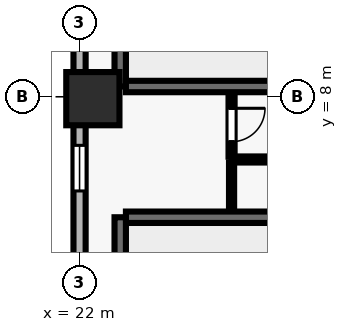
"""IFC4 building model, lengths in metres.
Left out: names, types, materials, properties, quantities, classifications, styles, units other than length and angle.
Written with IfcOpenShell. Run it as: python <this file> out.ifc"""

import sys

from ifc_helpers import new_model, si_unit, direction, frame, frame_2d, origin, origin_2d, place, context, subcontext, project, spatial, rectangle, extrude, element, fill, save


model = new_model("IFC4")
c1 = context("Model", 3, precision=1e-05, world=origin(), true_north=direction((0.0, 1.0)))
c2 = subcontext(c1, "Body", "Model", "MODEL_VIEW")
j1 = project(units=[si_unit("LENGTHUNIT", "METRE"), si_unit("PLANEANGLEUNIT", "RADIAN")], contexts=[c1])
p1 = place(None, origin())
s1 = spatial("IfcSite", under=j1, at=p1, CompositionType="ELEMENT")
p2 = place(p1, origin())
s2 = spatial("IfcBuilding", under=s1, at=p2, CompositionType="ELEMENT")
p3 = place(p2, frame((0.0, 0.0, 54.4)))
s3 = spatial("IfcBuildingStorey", under=s2, at=p3, CompositionType="ELEMENT", Elevation=54.4)
p4 = place(p3, frame((22.35, 7.95, 0.0), z_axis=(0.0, 0.0, 1.0), x_axis=(1.0, 0.0, 0.0)))
e1 = element("IfcColumn", 1, at=p4, inside=s3, PredefinedType="COLUMN", context=c2, shape_type="SweptSolid", body=[
    extrude(rectangle(XDim=1.4, YDim=1.4, at=origin_2d()), origin(), (0.0, 0.0, 1.0), 3.9),
])
p5 = place(p3, frame((22.0, 51.5, 0.0), z_axis=(0.0, 0.0, 1.0), x_axis=(0.0, -1.0, 0.0)))
e2 = element("IfcWall", 2, at=p5, inside=s3, PredefinedType="SOLIDWALL", context=c2, shape_type="SweptSolid", body=[
    extrude(rectangle(XDim=49.0, YDim=0.32, at=frame_2d((24.5, 0.0))), origin(), (0.0, 0.0, 1.0), 3.69),
])
p6 = place(p5, frame((17.8, 0.0, 0.0)))
e3 = element("IfcOpeningElement", 3, at=p6, cuts=e2, PredefinedType="OPENING", context=c2, shape_type="SweptSolid", body=[
    extrude(rectangle(XDim=1.0, YDim=2.2, at=frame_2d((0.5, 1.1))), frame((0.0, 0.17, 0.0), z_axis=(0.0, -1.0, 0.0), x_axis=(1.0, 0.0, 0.0)), (0.0, 0.0, 1.0), 0.34),
])
p7 = place(p5, frame((2.122, 0.0, 0.9)))
e4 = element("IfcOpeningElement", 4, at=p7, cuts=e2, PredefinedType="OPENING", context=c2, shape_type="SweptSolid", body=[
    extrude(rectangle(XDim=1.2, YDim=1.6, at=frame_2d((0.6, 0.8))), frame((0.0, 0.17, 0.0), z_axis=(0.0, -1.0, 0.0), x_axis=(1.0, 0.0, 0.0)), (0.0, 0.0, 1.0), 0.34),
])
p8 = place(p5, frame((7.567, 0.0, 0.9)))
e5 = element("IfcOpeningElement", 5, at=p8, cuts=e2, PredefinedType="OPENING", context=c2, shape_type="SweptSolid", body=[
    extrude(rectangle(XDim=1.2, YDim=1.6, at=frame_2d((0.6, 0.8))), frame((0.0, 0.17, 0.0), z_axis=(0.0, -1.0, 0.0), x_axis=(1.0, 0.0, 0.0)), (0.0, 0.0, 1.0), 0.34),
])
p9 = place(p5, frame((13.011, 0.0, 0.9)))
e6 = element("IfcOpeningElement", 6, at=p9, cuts=e2, PredefinedType="OPENING", context=c2, shape_type="SweptSolid", body=[
    extrude(rectangle(XDim=1.2, YDim=1.6, at=frame_2d((0.6, 0.8))), frame((0.0, 0.17, 0.0), z_axis=(0.0, -1.0, 0.0), x_axis=(1.0, 0.0, 0.0)), (0.0, 0.0, 1.0), 0.34),
])
p10 = place(p5, frame((19.356, 0.0, 0.9)))
e7 = element("IfcOpeningElement", 7, at=p10, cuts=e2, PredefinedType="OPENING", context=c2, shape_type="SweptSolid", body=[
    extrude(rectangle(XDim=1.2, YDim=1.6, at=frame_2d((0.6, 0.8))), frame((0.0, 0.17, 0.0), z_axis=(0.0, -1.0, 0.0), x_axis=(1.0, 0.0, 0.0)), (0.0, 0.0, 1.0), 0.34),
])
p11 = place(p5, frame((23.45, 0.0, 0.9)))
e8 = element("IfcOpeningElement", 8, at=p11, cuts=e2, PredefinedType="OPENING", context=c2, shape_type="SweptSolid", body=[
    extrude(rectangle(XDim=1.2, YDim=1.6, at=frame_2d((0.6, 0.8))), frame((0.0, 0.17, 0.0), z_axis=(0.0, -1.0, 0.0), x_axis=(1.0, 0.0, 0.0)), (0.0, 0.0, 1.0), 0.34),
])
p12 = place(p5, frame((29.344, 0.0, 0.9)))
e9 = element("IfcOpeningElement", 9, at=p12, cuts=e2, PredefinedType="OPENING", context=c2, shape_type="SweptSolid", body=[
    extrude(rectangle(XDim=1.2, YDim=1.6, at=frame_2d((0.6, 0.8))), frame((0.0, 0.17, 0.0), z_axis=(0.0, -1.0, 0.0), x_axis=(1.0, 0.0, 0.0)), (0.0, 0.0, 1.0), 0.34),
])
p13 = place(p5, frame((34.789, 0.0, 0.9)))
e10 = element("IfcOpeningElement", 10, at=p13, cuts=e2, PredefinedType="OPENING", context=c2, shape_type="SweptSolid", body=[
    extrude(rectangle(XDim=1.2, YDim=1.6, at=frame_2d((0.6, 0.8))), frame((0.0, 0.17, 0.0), z_axis=(0.0, -1.0, 0.0), x_axis=(1.0, 0.0, 0.0)), (0.0, 0.0, 1.0), 0.34),
])
p14 = place(p5, frame((40.233, 0.0, 0.9)))
e11 = element("IfcOpeningElement", 11, at=p14, cuts=e2, PredefinedType="OPENING", context=c2, shape_type="SweptSolid", body=[
    extrude(rectangle(XDim=1.2, YDim=1.6, at=frame_2d((0.6, 0.8))), frame((0.0, 0.17, 0.0), z_axis=(0.0, -1.0, 0.0), x_axis=(1.0, 0.0, 0.0)), (0.0, 0.0, 1.0), 0.34),
])
p15 = place(p5, frame((44.778, 0.0, 0.9)))
e12 = element("IfcOpeningElement", 12, at=p15, cuts=e2, PredefinedType="OPENING", context=c2, shape_type="SweptSolid", body=[
    extrude(rectangle(XDim=1.2, YDim=1.6, at=frame_2d((0.6, 0.8))), frame((0.0, 0.17, 0.0), z_axis=(0.0, -1.0, 0.0), x_axis=(1.0, 0.0, 0.0)), (0.0, 0.0, 1.0), 0.34),
])
p16 = place(p3, frame((31.58, 4.83, 0.0), z_axis=(0.0, 0.0, 1.0), x_axis=(-1.0, 0.0, 0.0)))
e13 = element("IfcWall", 13, at=p16, inside=s3, PredefinedType="SHEAR", context=c2, shape_type="SweptSolid", body=[
    extrude(rectangle(XDim=8.36, YDim=0.3, at=frame_2d((4.18, 0.0))), origin(), (0.0, 0.0, 1.0), 3.69),
])
for number, where, z_axis, x_axis in (
    (14, (23.07, 4.83, 0.0), (0.0, 0.0, 1.0), (0.0, -1.0, 0.0)),
    (15, (23.07, 11.78, 0.0), (0.0, 0.0, 1.0), (0.0, -1.0, 0.0)),
):
    element("IfcWall", number, at=place(p3, frame(where, z_axis=z_axis, x_axis=x_axis)), inside=s3, PredefinedType="SHEAR", context=c2, shape_type="SweptSolid", body=[
        extrude(rectangle(XDim=3.51, YDim=0.3, at=frame_2d((1.755, 0.0))), origin(), (0.0, 0.0, 1.0), 3.69),
    ])
p17 = place(p3, frame((23.22, 8.27, 0.0), z_axis=(0.0, 0.0, 1.0), x_axis=(1.0, 0.0, 0.0)))
e16 = element("IfcWall", 16, at=p17, inside=s3, PredefinedType="SHEAR", context=c2, shape_type="SweptSolid", body=[
    extrude(rectangle(XDim=8.36, YDim=0.3, at=frame_2d((4.18, 0.0))), origin(), (0.0, 0.0, 1.0), 3.69),
])
p18 = place(p3, frame((26.0, 6.35, 0.0), z_axis=(0.0, 0.0, 1.0), x_axis=(1.0, 0.0, 0.0)))
e17 = element("IfcWall", 17, at=p18, inside=s3, PredefinedType="PARTITIONING", context=c2, shape_type="SweptSolid", body=[
    extrude(rectangle(XDim=2.85, YDim=0.16, at=frame_2d((1.425, 0.0))), origin(), (0.0, 0.0, 1.0), 3.69),
])
p19 = place(p18, frame((0.985, 0.0, 0.0)))
e18 = element("IfcOpeningElement", 18, at=p19, cuts=e17, PredefinedType="OPENING", context=c2, shape_type="SweptSolid", body=[
    extrude(rectangle(XDim=0.88, YDim=2.1, at=frame_2d((0.44, 1.05))), frame((0.0, 0.09, 0.0), z_axis=(0.0, -1.0, 0.0), x_axis=(1.0, 0.0, 0.0)), (0.0, 0.0, 1.0), 0.18),
])
p20 = place(p3, frame((26.0, 5.01, 0.0), z_axis=(0.0, 0.0, 1.0), x_axis=(0.0, 1.0, 0.0)))
e19 = element("IfcWall", 19, at=p20, inside=s3, PredefinedType="PARTITIONING", context=c2, shape_type="SweptSolid", body=[
    extrude(rectangle(XDim=1.265, YDim=0.135, at=frame_2d((0.632, 0.0))), origin(), (0.0, 0.0, 1.0), 3.69),
])
p21 = place(p3, frame((26.0, 8.09, 0.0), z_axis=(0.0, 0.0, 1.0), x_axis=(0.0, -1.0, 0.0)))
e20 = element("IfcWall", 20, at=p21, inside=s3, PredefinedType="PARTITIONING", context=c2, shape_type="SweptSolid", body=[
    extrude(rectangle(XDim=1.665, YDim=0.16, at=frame_2d((0.833, 0.0))), origin(), (0.0, 0.0, 1.0), 3.69),
])
p22 = place(p21, frame((0.393, 0.0, 0.0)))
e21 = element("IfcOpeningElement", 21, at=p22, cuts=e20, PredefinedType="OPENING", context=c2, shape_type="SweptSolid", body=[
    extrude(rectangle(XDim=0.88, YDim=2.1, at=frame_2d((0.44, 1.05))), frame((0.0, 0.09, 0.0), z_axis=(0.0, -1.0, 0.0), x_axis=(1.0, 0.0, 0.0)), (0.0, 0.0, 1.0), 0.18),
])
p23 = place(p15, origin())
e22 = element("IfcWindow", 22, at=p23, inside=s3, PartitioningType="SINGLE_PANEL", PredefinedType="WINDOW", context=c2, shape_type="SweptSolid", body=[
    extrude(rectangle(XDim=1.2, YDim=1.6, at=frame_2d((0.6, 0.8))), frame((0.0, 0.03, 0.0), z_axis=(0.0, -1.0, 0.0), x_axis=(1.0, 0.0, 0.0)), (0.0, 0.0, 1.0), 0.06),
])
fill(e12, e22)
p24 = place(p22, origin())
e23 = element("IfcDoor", 23, at=p24, inside=s3, OperationType="SINGLE_SWING_LEFT", PredefinedType="DOOR", context=c2, shape_type="SweptSolid", body=[
    extrude(rectangle(XDim=0.88, YDim=2.1, at=frame_2d((0.44, 1.05))), frame((0.0, 0.025, 0.0), z_axis=(0.0, -1.0, 0.0), x_axis=(1.0, 0.0, 0.0)), (0.0, 0.0, 1.0), 0.05),
])
fill(e21, e23)
save(model, sys.argv[1])
